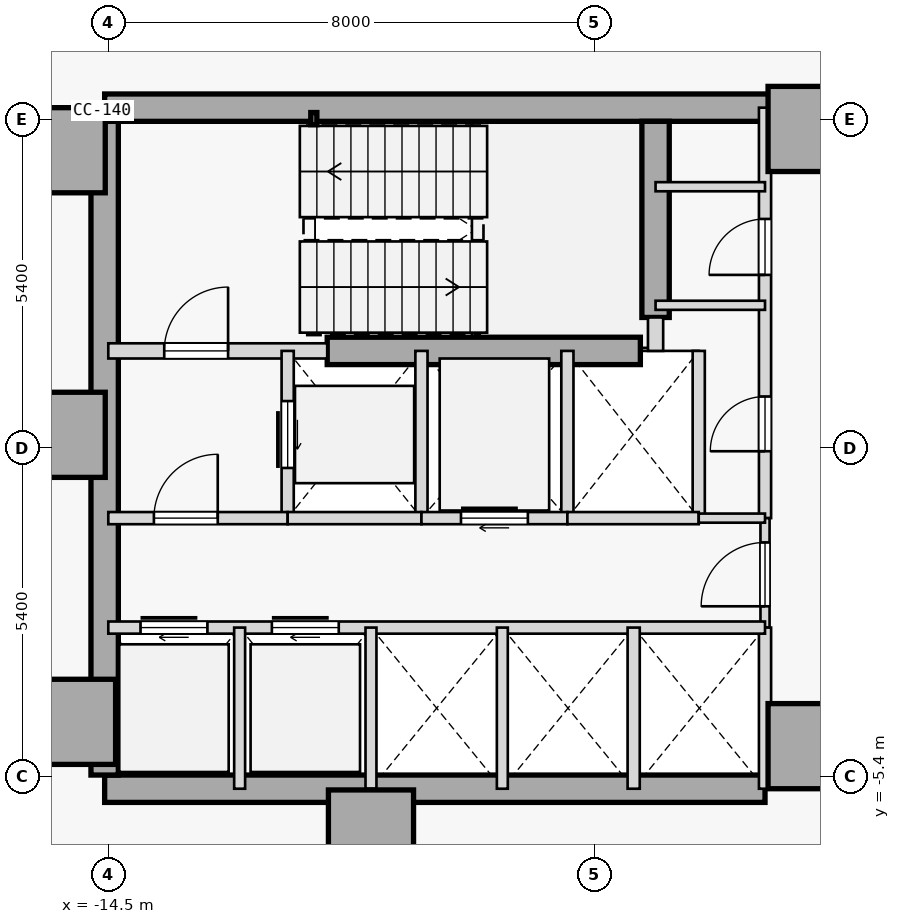
"""IFC4 building model, lengths in metres.
Left out: names, types, materials, properties, quantities, classifications, styles, units other than length and angle.
Written with IfcOpenShell. Run it as: python <this file> out.ifc"""

import sys

from ifc_helpers import new_model, si_unit, direction, frame, frame_2d, origin, origin_2d, place, context, subcontext, project, spatial, rectangle, hollow_rectangle, extrude, element, fill, save


model = new_model("IFC4")
c1 = context("Model", 3, precision=1e-05, world=origin(), true_north=direction((0.0, 1.0)))
c2 = subcontext(c1, "Body", "Model", "MODEL_VIEW")
j1 = project(units=[si_unit("LENGTHUNIT", "METRE"), si_unit("PLANEANGLEUNIT", "RADIAN")], contexts=[c1])
p1 = place(None, origin())
s1 = spatial("IfcSite", under=j1, at=p1, CompositionType="ELEMENT")
p2 = place(p1, origin())
s2 = spatial("IfcBuilding", under=s1, at=p2, CompositionType="ELEMENT")
p3 = place(p2, frame((0.0, 0.0, 18.0)))
s3 = spatial("IfcBuildingStorey", under=s2, at=p3, CompositionType="ELEMENT", Elevation=18.0)
for number, where, z_axis, x_axis in (
    (1, (-15.25, 4.9, 0.0), (0.0, 0.0, 1.0), (1.0, 0.0, 0.0)),
    (2, (-15.25, 0.22, 0.0), (0.0, 0.0, 1.0), (1.0, 0.0, 0.0)),
    (3, (-15.08, -4.5, 0.0), (0.0, 0.0, 1.0), (1.0, 0.0, 0.0)),
    (4, (-10.18, -6.32, 0.0), (0.0, 0.0, 1.0), (1.0, 0.0, 0.0)),
    (5, (-2.95, -4.9, 0.0), (0.0, 0.0, 1.0), (1.0, 0.0, 0.0)),
    (6, (-2.95, 5.25, 0.0), (0.0, 0.0, 1.0), (1.0, 0.0, 0.0)),
):
    element("IfcColumn", number, at=place(p3, frame(where, z_axis=z_axis, x_axis=x_axis)), inside=s3, PredefinedType="COLUMN", context=c2, shape_type="SweptSolid", body=[
        extrude(rectangle(XDim=1.4, YDim=1.4, at=origin_2d()), origin(), (0.0, 0.0, 1.0), 3.8),
    ])
p4 = place(p3, frame((-14.56, 5.6, 0.0), z_axis=(0.0, 0.0, 1.0), x_axis=(1.0, 0.0, 0.0)))
e7 = element("IfcWall", 7, at=p4, inside=s3, PredefinedType="SHEAR", context=c2, shape_type="SweptSolid", body=[
    extrude(rectangle(XDim=11.41, YDim=0.45, at=frame_2d((5.705, 0.0))), origin(), (0.0, 0.0, 1.0), 3.575),
])
p5 = place(p3, frame((-14.56, -5.6, 0.0), z_axis=(0.0, 0.0, 1.0), x_axis=(1.0, 0.0, 0.0)))
e8 = element("IfcWall", 8, at=p5, inside=s3, PredefinedType="SHEAR", context=c2, shape_type="SweptSolid", body=[
    extrude(rectangle(XDim=10.86, YDim=0.45, at=frame_2d((5.43, 0.0))), origin(), (0.0, 0.0, 1.0), 3.575),
])
p6 = place(p3, frame((-14.56, -5.375, 0.0), z_axis=(0.0, 0.0, 1.0), x_axis=(0.0, 1.0, 0.0)))
e9 = element("IfcWall", 9, at=p6, inside=s3, PredefinedType="SHEAR", context=c2, shape_type="SweptSolid", body=[
    extrude(rectangle(XDim=10.75, YDim=0.45, at=frame_2d((5.375, 0.0))), origin(), (0.0, 0.0, 1.0), 3.575),
])
p7 = place(p3, frame((-5.5, 2.15, 0.0), z_axis=(0.0, 0.0, 1.0), x_axis=(0.0, 1.0, 0.0)))
e10 = element("IfcWall", 10, at=p7, inside=s3, PredefinedType="SHEAR", context=c2, shape_type="SweptSolid", body=[
    extrude(rectangle(XDim=3.225, YDim=0.45, at=frame_2d((1.613, 0.0))), origin(), (0.0, 0.0, 1.0), 3.575),
])
p8 = place(p3, frame((-10.9, 1.6, 0.0), z_axis=(0.0, 0.0, 1.0), x_axis=(1.0, 0.0, 0.0)))
e11 = element("IfcWall", 11, at=p8, inside=s3, PredefinedType="SHEAR", context=c2, shape_type="SweptSolid", body=[
    extrude(rectangle(XDim=5.15, YDim=0.45, at=frame_2d((2.575, 0.0))), origin(), (0.0, 0.0, 1.0), 3.575),
])
p9 = place(p3, frame((-11.12, 5.42, 0.0), z_axis=(0.0, 0.0, 1.0), x_axis=(1.0, 0.0, 0.0)))
e12 = element("IfcColumn", 12, at=p9, inside=s3, PredefinedType="COLUMN", context=c2, shape_type="SweptSolid", body=[
    extrude(hollow_rectangle(XDim=0.1, YDim=0.2, WallThickness=0.008, at=origin_2d()), origin(), (0.0, 0.0, 1.0), 3.8),
])
p10 = place(p3, frame((-14.5, 1.6, 0.0), z_axis=(0.0, 0.0, 1.0), x_axis=(1.0, 0.0, 0.0)))
e13 = element("IfcWall", 13, at=p10, inside=s3, PredefinedType="STANDARD", context=c2, shape_type="SweptSolid", body=[
    extrude(rectangle(XDim=3.6, YDim=0.25, at=frame_2d((1.8, 0.0))), origin(), (0.0, 0.0, 1.0), 3.575),
])
p11 = place(p10, frame((0.92, 0.0, 0.0)))
e14 = element("IfcOpeningElement", 14, at=p11, cuts=e13, PredefinedType="OPENING", context=c2, shape_type="SweptSolid", body=[
    extrude(rectangle(XDim=1.05, YDim=2.15, at=frame_2d((0.525, 1.075))), frame((0.0, 0.135, 0.0), z_axis=(0.0, -1.0, 0.0), x_axis=(1.0, 0.0, 0.0)), (0.0, 0.0, 1.0), 0.27),
])
p12 = place(p3, frame((-5.5, 1.6, 0.0), z_axis=(0.0, 0.0, 1.0), x_axis=(0.0, 1.0, 0.0)))
e15 = element("IfcWall", 15, at=p12, inside=s3, PredefinedType="STANDARD", context=c2, shape_type="SweptSolid", body=[
    extrude(rectangle(XDim=0.55, YDim=0.25, at=frame_2d((0.275, 0.0))), origin(), (0.0, 0.0, 1.0), 3.575),
])
p13 = place(p3, frame((-3.7, -1.15, 0.0), z_axis=(0.0, 0.0, 1.0), x_axis=(0.0, 1.0, 0.0)))
e16 = element("IfcWall", 16, at=p13, inside=s3, PredefinedType="STANDARD", context=c2, shape_type="SweptSolid", body=[
    extrude(rectangle(XDim=6.75, YDim=0.2, at=frame_2d((3.375, 0.0))), origin(), (0.0, 0.0, 1.0), 3.575),
])
p14 = place(p13, frame((1.1, 0.0, 0.0)))
e17 = element("IfcOpeningElement", 17, at=p14, cuts=e16, PredefinedType="OPENING", context=c2, shape_type="SweptSolid", body=[
    extrude(rectangle(XDim=0.9, YDim=2.15, at=frame_2d((0.45, 1.075))), frame((0.0, 0.11, 0.0), z_axis=(0.0, -1.0, 0.0), x_axis=(1.0, 0.0, 0.0)), (0.0, 0.0, 1.0), 0.22),
])
p15 = place(p13, frame((4.0, 0.0, 0.0)))
e18 = element("IfcOpeningElement", 18, at=p15, cuts=e16, PredefinedType="OPENING", context=c2, shape_type="SweptSolid", body=[
    extrude(rectangle(XDim=0.92, YDim=2.15, at=frame_2d((0.46, 1.075))), frame((0.0, 0.11, 0.0), z_axis=(0.0, -1.0, 0.0), x_axis=(1.0, 0.0, 0.0)), (0.0, 0.0, 1.0), 0.22),
])
p16 = place(p3, frame((-3.7, -2.95, 0.0), z_axis=(0.0, 0.0, 1.0), x_axis=(0.0, 1.0, 0.0)))
e19 = element("IfcWall", 19, at=p16, inside=s3, PredefinedType="PARTITIONING", context=c2, shape_type="SweptSolid", body=[
    extrude(rectangle(XDim=1.8, YDim=0.15, at=frame_2d((0.9, 0.0))), origin(), (0.0, 0.0, 1.0), 3.575),
])
p17 = place(p16, frame((0.35, 0.0, 0.0)))
e20 = element("IfcOpeningElement", 20, at=p17, cuts=e19, PredefinedType="OPENING", context=c2, shape_type="SweptSolid", body=[
    extrude(rectangle(XDim=1.05, YDim=2.18, at=frame_2d((0.525, 1.09))), frame((0.0, 0.085, 0.0), z_axis=(0.0, -1.0, 0.0), x_axis=(1.0, 0.0, 0.0)), (0.0, 0.0, 1.0), 0.17),
])
p18 = place(p3, frame((-3.7, -5.6, 0.0), z_axis=(0.0, 0.0, 1.0), x_axis=(0.0, 1.0, 0.0)))
e21 = element("IfcWall", 21, at=p18, inside=s3, PredefinedType="STANDARD", context=c2, shape_type="SweptSolid", body=[
    extrude(rectangle(XDim=2.65, YDim=0.2, at=frame_2d((1.325, 0.0))), origin(), (0.0, 0.0, 1.0), 3.575),
])
p19 = place(p3, frame((-11.55, -1.15, 0.0), z_axis=(0.0, 0.0, 1.0), x_axis=(0.0, 1.0, 0.0)))
e22 = element("IfcWall", 22, at=p19, inside=s3, PredefinedType="STANDARD", context=c2, shape_type="SweptSolid", body=[
    extrude(rectangle(XDim=2.75, YDim=0.2, at=frame_2d((1.375, 0.0))), origin(), (0.0, 0.0, 1.0), 3.575),
])
p20 = place(p19, frame((0.825, 0.0, 0.0)))
e23 = element("IfcOpeningElement", 23, at=p20, cuts=e22, PredefinedType="OPENING", context=c2, shape_type="SweptSolid", body=[
    extrude(rectangle(XDim=1.1, YDim=2.15, at=frame_2d((0.55, 1.075))), frame((0.0, 0.11, 0.0), z_axis=(0.0, -1.0, 0.0), x_axis=(1.0, 0.0, 0.0)), (0.0, 0.0, 1.0), 0.22),
])
p21 = place(p3, frame((-9.35, -1.15, 0.0), z_axis=(0.0, 0.0, 1.0), x_axis=(0.0, 1.0, 0.0)))
e24 = element("IfcWall", 24, at=p21, inside=s3, PredefinedType="STANDARD", context=c2, shape_type="SweptSolid", body=[
    extrude(rectangle(XDim=2.75, YDim=0.2, at=frame_2d((1.375, 0.0))), origin(), (0.0, 0.0, 1.0), 3.575),
])
p22 = place(p3, frame((-14.5, -1.15, 0.0), z_axis=(0.0, 0.0, 1.0), x_axis=(1.0, 0.0, 0.0)))
e25 = element("IfcWall", 25, at=p22, inside=s3, PredefinedType="STANDARD", context=c2, shape_type="SweptSolid", body=[
    extrude(rectangle(XDim=2.95, YDim=0.2, at=frame_2d((1.475, 0.0))), origin(), (0.0, 0.0, 1.0), 3.575),
])
p23 = place(p22, frame((0.75, 0.0, 0.0)))
e26 = element("IfcOpeningElement", 26, at=p23, cuts=e25, PredefinedType="OPENING", context=c2, shape_type="SweptSolid", body=[
    extrude(rectangle(XDim=1.05, YDim=2.18, at=frame_2d((0.525, 1.09))), frame((0.0, 0.11, 0.0), z_axis=(0.0, -1.0, 0.0), x_axis=(1.0, 0.0, 0.0)), (0.0, 0.0, 1.0), 0.22),
])
p24 = place(p3, frame((-11.55, -1.15, 0.0), z_axis=(0.0, 0.0, 1.0), x_axis=(1.0, 0.0, 0.0)))
e27 = element("IfcWall", 27, at=p24, inside=s3, PredefinedType="STANDARD", context=c2, shape_type="SweptSolid", body=[
    extrude(rectangle(XDim=2.2, YDim=0.2, at=frame_2d((1.1, 0.0))), origin(), (0.0, 0.0, 1.0), 3.575),
])
p25 = place(p3, frame((-6.95, -1.15, 0.0), z_axis=(0.0, 0.0, 1.0), x_axis=(0.0, 1.0, 0.0)))
e28 = element("IfcWall", 28, at=p25, inside=s3, PredefinedType="STANDARD", context=c2, shape_type="SweptSolid", body=[
    extrude(rectangle(XDim=2.75, YDim=0.2, at=frame_2d((1.375, 0.0))), origin(), (0.0, 0.0, 1.0), 3.575),
])
p26 = place(p3, frame((-9.35, -1.15, 0.0), z_axis=(0.0, 0.0, 1.0), x_axis=(1.0, 0.0, 0.0)))
e29 = element("IfcWall", 29, at=p26, inside=s3, PredefinedType="STANDARD", context=c2, shape_type="SweptSolid", body=[
    extrude(rectangle(XDim=2.4, YDim=0.2, at=frame_2d((1.2, 0.0))), origin(), (0.0, 0.0, 1.0), 3.575),
])
p27 = place(p26, frame((0.65, 0.0, 0.0)))
e30 = element("IfcOpeningElement", 30, at=p27, cuts=e29, PredefinedType="OPENING", context=c2, shape_type="SweptSolid", body=[
    extrude(rectangle(XDim=1.1, YDim=2.15, at=frame_2d((0.55, 1.075))), frame((0.0, 0.11, 0.0), z_axis=(0.0, -1.0, 0.0), x_axis=(1.0, 0.0, 0.0)), (0.0, 0.0, 1.0), 0.22),
])
p28 = place(p3, frame((-4.79, -1.15, 0.0), z_axis=(0.0, 0.0, 1.0), x_axis=(0.0, 1.0, 0.0)))
e31 = element("IfcWall", 31, at=p28, inside=s3, PredefinedType="STANDARD", context=c2, shape_type="SweptSolid", body=[
    extrude(rectangle(XDim=2.75, YDim=0.2, at=frame_2d((1.375, 0.0))), origin(), (0.0, 0.0, 1.0), 3.575),
])
p29 = place(p3, frame((-6.95, -1.15, 0.0), z_axis=(0.0, 0.0, 1.0), x_axis=(1.0, 0.0, 0.0)))
e32 = element("IfcWall", 32, at=p29, inside=s3, PredefinedType="STANDARD", context=c2, shape_type="SweptSolid", body=[
    extrude(rectangle(XDim=2.16, YDim=0.2, at=frame_2d((1.08, 0.0))), origin(), (0.0, 0.0, 1.0), 3.575),
])
p30 = place(p3, frame((-4.79, -1.15, 0.0), z_axis=(0.0, 0.0, 1.0), x_axis=(1.0, 0.0, 0.0)))
e33 = element("IfcWall", 33, at=p30, inside=s3, PredefinedType="PARTITIONING", context=c2, shape_type="SweptSolid", body=[
    extrude(rectangle(XDim=1.09, YDim=0.15, at=frame_2d((0.545, 0.0))), origin(), (0.0, 0.0, 1.0), 3.575),
])
p31 = place(p3, frame((-14.5, -2.95, 0.0), z_axis=(0.0, 0.0, 1.0), x_axis=(1.0, 0.0, 0.0)))
e34 = element("IfcWall", 34, at=p31, inside=s3, PredefinedType="STANDARD", context=c2, shape_type="SweptSolid", body=[
    extrude(rectangle(XDim=10.8, YDim=0.2, at=frame_2d((5.4, 0.0))), origin(), (0.0, 0.0, 1.0), 3.575),
])
p32 = place(p31, frame((0.53, 0.0, 0.0)))
e35 = element("IfcOpeningElement", 35, at=p32, cuts=e34, PredefinedType="OPENING", context=c2, shape_type="SweptSolid", body=[
    extrude(rectangle(XDim=1.1, YDim=2.15, at=frame_2d((0.55, 1.075))), frame((0.0, 0.11, 0.0), z_axis=(0.0, -1.0, 0.0), x_axis=(1.0, 0.0, 0.0)), (0.0, 0.0, 1.0), 0.22),
])
p33 = place(p31, frame((2.69, 0.0, 0.0)))
e36 = element("IfcOpeningElement", 36, at=p33, cuts=e34, PredefinedType="OPENING", context=c2, shape_type="SweptSolid", body=[
    extrude(rectangle(XDim=1.1, YDim=2.15, at=frame_2d((0.55, 1.075))), frame((0.0, 0.11, 0.0), z_axis=(0.0, -1.0, 0.0), x_axis=(1.0, 0.0, 0.0)), (0.0, 0.0, 1.0), 0.22),
])
p34 = place(p3, frame((-5.86, -5.6, 0.0), z_axis=(0.0, 0.0, 1.0), x_axis=(0.0, 1.0, 0.0)))
e37 = element("IfcWall", 37, at=p34, inside=s3, PredefinedType="STANDARD", context=c2, shape_type="SweptSolid", body=[
    extrude(rectangle(XDim=2.65, YDim=0.2, at=frame_2d((1.325, 0.0))), origin(), (0.0, 0.0, 1.0), 3.575),
])
for number, where, z_axis, x_axis in (
    (38, (-12.34, -5.6, 0.0), (0.0, 0.0, 1.0), (0.0, 1.0, 0.0)),
    (39, (-10.18, -5.6, 0.0), (0.0, 0.0, 1.0), (0.0, 1.0, 0.0)),
    (40, (-8.02, -5.6, 0.0), (0.0, 0.0, 1.0), (0.0, 1.0, 0.0)),
):
    element("IfcWall", number, at=place(p3, frame(where, z_axis=z_axis, x_axis=x_axis)), inside=s3, PredefinedType="STANDARD", context=c2, shape_type="SweptSolid", body=[
        extrude(rectangle(XDim=2.65, YDim=0.18, at=frame_2d((1.325, 0.0))), origin(), (0.0, 0.0, 1.0), 3.575),
    ])
for number, where, z_axis, x_axis in (
    (41, (-5.5, 4.3, 0.0), (0.0, 0.0, 1.0), (1.0, 0.0, 0.0)),
    (42, (-5.5, 2.35, 0.0), (0.0, 0.0, 1.0), (1.0, 0.0, 0.0)),
):
    element("IfcWall", number, at=place(p3, frame(where, z_axis=z_axis, x_axis=x_axis)), inside=s3, PredefinedType="PARTITIONING", context=c2, shape_type="SweptSolid", body=[
        extrude(rectangle(XDim=1.8, YDim=0.15, at=frame_2d((0.9, 0.0))), origin(), (0.0, 0.0, 1.0), 3.575),
    ])
p35 = place(p11, origin())
e43 = element("IfcDoor", 43, at=p35, inside=s3, OperationType="SINGLE_SWING_RIGHT", PredefinedType="DOOR", context=c2, shape_type="SweptSolid", body=[
    extrude(rectangle(XDim=1.05, YDim=2.15, at=frame_2d((0.525, 1.075))), frame((0.0, 0.025, 0.0), z_axis=(0.0, -1.0, 0.0), x_axis=(1.0, 0.0, 0.0)), (0.0, 0.0, 1.0), 0.05),
])
fill(e14, e43)
p36 = place(p23, origin())
e44 = element("IfcDoor", 44, at=p36, inside=s3, OperationType="SINGLE_SWING_RIGHT", PredefinedType="DOOR", context=c2, shape_type="SweptSolid", body=[
    extrude(rectangle(XDim=1.05, YDim=2.18, at=frame_2d((0.525, 1.09))), frame((0.0, 0.025, 0.0), z_axis=(0.0, -1.0, 0.0), x_axis=(1.0, 0.0, 0.0)), (0.0, 0.0, 1.0), 0.05),
])
fill(e26, e44)
p37 = place(p17, origin())
e45 = element("IfcDoor", 45, at=p37, inside=s3, OperationType="SINGLE_SWING_LEFT", PredefinedType="DOOR", context=c2, shape_type="SweptSolid", body=[
    extrude(rectangle(XDim=1.05, YDim=2.18, at=frame_2d((0.525, 1.09))), frame((0.0, 0.025, 0.0), z_axis=(0.0, -1.0, 0.0), x_axis=(1.0, 0.0, 0.0)), (0.0, 0.0, 1.0), 0.05),
])
fill(e20, e45)
p38 = place(p20, origin())
e46 = element("IfcDoor", 46, at=p38, inside=s3, OperationType="SLIDING_TO_RIGHT", PredefinedType="DOOR", context=c2, shape_type="SweptSolid", body=[
    extrude(rectangle(XDim=1.1, YDim=2.15, at=frame_2d((0.55, 1.075))), frame((0.0, 0.025, 0.0), z_axis=(0.0, -1.0, 0.0), x_axis=(1.0, 0.0, 0.0)), (0.0, 0.0, 1.0), 0.05),
])
fill(e23, e46)
p39 = place(p27, origin())
e47 = element("IfcDoor", 47, at=p39, inside=s3, OperationType="SLIDING_TO_RIGHT", PredefinedType="DOOR", context=c2, shape_type="SweptSolid", body=[
    extrude(rectangle(XDim=1.1, YDim=2.15, at=frame_2d((0.55, 1.075))), frame((0.0, 0.025, 0.0), z_axis=(0.0, -1.0, 0.0), x_axis=(1.0, 0.0, 0.0)), (0.0, 0.0, 1.0), 0.05),
])
fill(e30, e47)
p40 = place(p32, origin())
e48 = element("IfcDoor", 48, at=p40, inside=s3, OperationType="SLIDING_TO_RIGHT", PredefinedType="DOOR", context=c2, shape_type="SweptSolid", body=[
    extrude(rectangle(XDim=1.1, YDim=2.15, at=frame_2d((0.55, 1.075))), frame((0.0, 0.025, 0.0), z_axis=(0.0, -1.0, 0.0), x_axis=(1.0, 0.0, 0.0)), (0.0, 0.0, 1.0), 0.05),
])
fill(e35, e48)
p41 = place(p33, origin())
e49 = element("IfcDoor", 49, at=p41, inside=s3, OperationType="SLIDING_TO_RIGHT", PredefinedType="DOOR", context=c2, shape_type="SweptSolid", body=[
    extrude(rectangle(XDim=1.1, YDim=2.15, at=frame_2d((0.55, 1.075))), frame((0.0, 0.025, 0.0), z_axis=(0.0, -1.0, 0.0), x_axis=(1.0, 0.0, 0.0)), (0.0, 0.0, 1.0), 0.05),
])
fill(e36, e49)
p42 = place(p14, origin())
e50 = element("IfcDoor", 50, at=p42, inside=s3, OperationType="SINGLE_SWING_LEFT", PredefinedType="DOOR", context=c2, shape_type="SweptSolid", body=[
    extrude(rectangle(XDim=0.9, YDim=2.15, at=frame_2d((0.45, 1.075))), frame((0.0, 0.025, 0.0), z_axis=(0.0, -1.0, 0.0), x_axis=(1.0, 0.0, 0.0)), (0.0, 0.0, 1.0), 0.05),
])
fill(e17, e50)
p43 = place(p15, origin())
e51 = element("IfcDoor", 51, at=p43, inside=s3, OperationType="SINGLE_SWING_LEFT", PredefinedType="DOOR", context=c2, shape_type="SweptSolid", body=[
    extrude(rectangle(XDim=0.92, YDim=2.15, at=frame_2d((0.46, 1.075))), frame((0.0, 0.025, 0.0), z_axis=(0.0, -1.0, 0.0), x_axis=(1.0, 0.0, 0.0)), (0.0, 0.0, 1.0), 0.05),
])
fill(e18, e51)
save(model, sys.argv[1])
